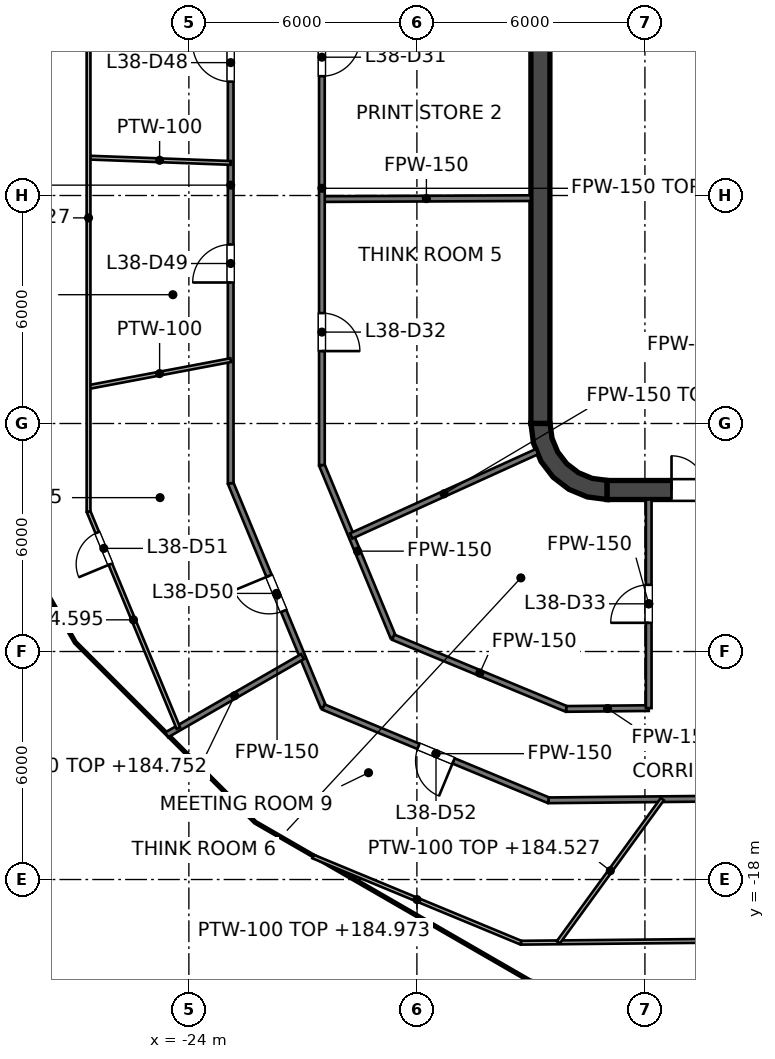
"""IFC4 building model, lengths in metres.
Left out: names, types, materials, properties, quantities, classifications, styles, units other than length and angle.
Written with IfcOpenShell. Run it as: python <this file> out.ifc"""

import sys

from ifc_helpers import new_model, si_unit, direction, frame, frame_2d, origin, place, context, subcontext, project, spatial, polyline, rectangle, outline, extrude, element, fill, save


model = new_model("IFC4")
c1 = context("Model", 3, precision=1e-05, world=origin(), true_north=direction((0.0, 1.0)))
c2 = subcontext(c1, "Body", "Model", "MODEL_VIEW")
j1 = project(units=[si_unit("LENGTHUNIT", "METRE"), si_unit("PLANEANGLEUNIT", "RADIAN")], contexts=[c1])
p1 = place(None, origin())
s1 = spatial("IfcSite", under=j1, at=p1, CompositionType="ELEMENT")
p2 = place(p1, origin())
s2 = spatial("IfcBuilding", under=s1, at=p2, CompositionType="ELEMENT")
p3 = place(p2, frame((0.0, 0.0, 181.6)))
s3 = spatial("IfcBuildingStorey", under=s2, at=p3, CompositionType="ELEMENT", Elevation=181.6)
p4 = place(p3, frame((-13.0, -7.75, 0.0), z_axis=(0.0, 0.0, 1.0), x_axis=(1.0, 0.0, 0.0)))
e1 = element("IfcWall", 1, at=p4, inside=s3, PredefinedType="SHEAR", context=c2, shape_type="SweptSolid", body=[
    extrude(rectangle(XDim=26.0, YDim=0.5, at=frame_2d((13.0, 0.0))), origin(), (0.0, 0.0, 1.0), 4.0),
])
p5 = place(p4, frame((1.7, 0.0, 0.0)))
e2 = element("IfcOpeningElement", 2, at=p5, cuts=e1, PredefinedType="OPENING", context=c2, shape_type="SweptSolid", body=[
    extrude(rectangle(XDim=1.8, YDim=2.1, at=frame_2d((0.9, 1.05))), frame((0.0, 0.25, 0.0), z_axis=(0.0, -1.0, 0.0), x_axis=(1.0, 0.0, 0.0)), (0.0, 0.0, 1.0), 0.5),
])
p6 = place(p4, frame((22.5, 0.0, 0.0)))
e3 = element("IfcOpeningElement", 3, at=p6, cuts=e1, PredefinedType="OPENING", context=c2, shape_type="SweptSolid", body=[
    extrude(rectangle(XDim=1.8, YDim=2.1, at=frame_2d((0.9, 1.05))), frame((0.0, 0.25, 0.0), z_axis=(0.0, -1.0, 0.0), x_axis=(1.0, 0.0, 0.0)), (0.0, 0.0, 1.0), 0.5),
])
p7 = place(p3, frame((-14.75, -6.0, 0.0), z_axis=(0.0, 0.0, 1.0), x_axis=(0.0, 1.0, 0.0)))
e4 = element("IfcWall", 4, at=p7, inside=s3, PredefinedType="SHEAR", context=c2, shape_type="SweptSolid", body=[
    extrude(rectangle(XDim=12.0, YDim=0.5, at=frame_2d((6.0, 0.0))), origin(), (0.0, 0.0, 1.0), 4.0),
])
p8 = place(p3, origin())
e5 = element("IfcWall", 5, at=p8, inside=s3, PredefinedType="SHEAR", context=c2, shape_type="SweptSolid", body=[
    extrude(outline(polyline([(-13.0, -8.0), (-13.0, -7.496), (-13.387, -7.445), (-13.748, -7.295), (-14.058, -7.058), (-14.295, -6.748), (-14.445, -6.387), (-14.496, -6.0), (-15.0, -6.0), (-14.932, -6.518), (-14.732, -7.0), (-14.414, -7.414), (-14.0, -7.732), (-13.518, -7.932), (-13.0, -8.0)])), origin(), (0.0, 0.0, 1.0), 4.0),
])
p9 = place(p3, frame((-11.8, -7.5, 0.0), z_axis=(0.0, 0.0, 1.0), x_axis=(0.0, 1.0, 0.0)))
e6 = element("IfcWall", 6, at=p9, inside=s3, PredefinedType="SOLIDWALL", context=c2, shape_type="SweptSolid", body=[
    extrude(rectangle(XDim=15.0, YDim=0.4, at=frame_2d((7.5, 0.0))), origin(), (0.0, 0.0, 1.0), 3.85),
])
p10 = place(p9, frame((11.3, 0.0, 0.0)))
e7 = element("IfcOpeningElement", 7, at=p10, cuts=e6, PredefinedType="OPENING", context=c2, shape_type="SweptSolid", body=[
    extrude(rectangle(XDim=1.1, YDim=2.1, at=frame_2d((0.55, 1.05))), frame((0.0, 0.2, 0.0), z_axis=(0.0, -1.0, 0.0), x_axis=(1.0, 0.0, 0.0)), (0.0, 0.0, 1.0), 0.4),
])
p11 = place(p9, frame((8.4, 0.0, 0.0)))
e8 = element("IfcOpeningElement", 8, at=p11, cuts=e6, PredefinedType="OPENING", context=c2, shape_type="SweptSolid", body=[
    extrude(rectangle(XDim=1.1, YDim=2.1, at=frame_2d((0.55, 1.05))), frame((0.0, 0.2, 0.0), z_axis=(0.0, -1.0, 0.0), x_axis=(1.0, 0.0, 0.0)), (0.0, 0.0, 1.0), 0.4),
])
p12 = place(p9, frame((5.5, 0.0, 0.0)))
e9 = element("IfcOpeningElement", 9, at=p12, cuts=e6, PredefinedType="OPENING", context=c2, shape_type="SweptSolid", body=[
    extrude(rectangle(XDim=1.1, YDim=2.1, at=frame_2d((0.55, 1.05))), frame((0.0, 0.2, 0.0), z_axis=(0.0, -1.0, 0.0), x_axis=(1.0, 0.0, 0.0)), (0.0, 0.0, 1.0), 0.4),
])
p13 = place(p9, frame((13.697, 0.0, 0.0)))
e10 = element("IfcOpeningElement", 10, at=p13, cuts=e6, PredefinedType="OPENING", context=c2, shape_type="SweptSolid", body=[
    extrude(rectangle(XDim=0.9, YDim=2.1, at=frame_2d((0.45, 1.05))), frame((0.0, 0.2, 0.0), z_axis=(0.0, -1.0, 0.0), x_axis=(1.0, 0.0, 0.0)), (0.0, 0.0, 1.0), 0.4),
])
p14 = place(p9, frame((0.403, 0.0, 0.0)))
e11 = element("IfcOpeningElement", 11, at=p14, cuts=e6, PredefinedType="OPENING", context=c2, shape_type="SweptSolid", body=[
    extrude(rectangle(XDim=0.9, YDim=2.1, at=frame_2d((0.45, 1.05))), frame((0.0, 0.2, 0.0), z_axis=(0.0, -1.0, 0.0), x_axis=(1.0, 0.0, 0.0)), (0.0, 0.0, 1.0), 0.4),
])
e12 = element("IfcWall", 12, at=p8, inside=s3, PredefinedType="SOLIDWALL", context=c2, shape_type="SweptSolid", body=[
    extrude(outline(polyline([(-12.0, -5.925), (-12.0, -5.675), (-14.25, -5.675), (-14.25, -3.025), (-12.0, -3.025), (-12.0, -2.775), (-14.25, -2.775), (-14.25, -0.125), (-12.0, -0.125), (-12.0, 0.125), (-14.25, 0.125), (-14.25, 2.775), (-12.0, 2.775), (-12.0, 3.025), (-14.25, 3.025), (-14.25, 5.675), (-12.0, 5.675), (-12.0, 5.925), (-14.25, 5.925), (-14.5, 5.925), (-14.5, 5.675), (-14.5, 3.025), (-14.5, 2.775), (-14.5, 0.125), (-14.5, -0.125), (-14.5, -2.775), (-14.5, -3.025), (-14.5, -5.675), (-14.5, -5.925), (-14.25, -5.925), (-12.0, -5.925)])), origin(), (0.0, 0.0, 1.0), 3.85),
])
p15 = place(p3, frame((-22.9, -7.572, 0.0), z_axis=(0.0, 0.0, 1.0), x_axis=(0.382906596633, -0.923787063265, 0.0)))
e13 = element("IfcWall", 13, at=p15, inside=s3, PredefinedType="PARTITIONING", context=c2, shape_type="SweptSolid", body=[
    extrude(rectangle(XDim=6.374, YDim=0.15, at=frame_2d((3.187, 0.0))), origin(), (0.0, 0.0, 1.0), 2.995),
])
p16 = place(p15, frame((2.638, 0.0, 0.0)))
e14 = element("IfcOpeningElement", 14, at=p16, cuts=e13, PredefinedType="OPENING", context=c2, shape_type="SweptSolid", body=[
    extrude(rectangle(XDim=1.0, YDim=2.1, at=frame_2d((0.5, 1.05))), frame((0.0, 0.075, 0.0), z_axis=(0.0, -1.0, 0.0), x_axis=(1.0, 0.0, 0.0)), (0.0, 0.0, 1.0), 0.15),
])
p17 = place(p3, frame((-20.5, -7.095, 0.0), z_axis=(0.0, 0.0, 1.0), x_axis=(0.382920689694, -0.923781221613, 0.0)))
e15 = element("IfcWall", 15, at=p17, inside=s3, PredefinedType="PARTITIONING", context=c2, shape_type="SweptSolid", body=[
    extrude(rectangle(XDim=4.902, YDim=0.15, at=frame_2d((2.451, 0.0))), origin(), (0.0, 0.0, 1.0), 2.995),
])
p18 = place(p3, frame((-20.46, -13.46, 0.0), z_axis=(0.0, 0.0, 1.0), x_axis=(0.923801547606, -0.382871650349, 0.0)))
e16 = element("IfcWall", 16, at=p18, inside=s3, PredefinedType="PARTITIONING", context=c2, shape_type="SweptSolid", body=[
    extrude(rectangle(XDim=6.415, YDim=0.15, at=frame_2d((3.208, 0.0))), origin(), (0.0, 0.0, 1.0), 2.995),
])
p19 = place(p18, frame((2.707, 0.0, 0.0)))
e17 = element("IfcOpeningElement", 17, at=p19, cuts=e16, PredefinedType="OPENING", context=c2, shape_type="SweptSolid", body=[
    extrude(rectangle(XDim=1.0, YDim=2.1, at=frame_2d((0.5, 1.05))), frame((0.0, 0.075, 0.0), z_axis=(0.0, -1.0, 0.0), x_axis=(1.0, 0.0, 0.0)), (0.0, 0.0, 1.0), 0.15),
])
p20 = place(p3, frame((-18.623, -11.623, 0.0), z_axis=(0.0, 0.0, 1.0), x_axis=(0.923791670587, -0.38289548098, 0.0)))
e18 = element("IfcWall", 18, at=p20, inside=s3, PredefinedType="PARTITIONING", context=c2, shape_type="SweptSolid", body=[
    extrude(rectangle(XDim=4.931, YDim=0.15, at=frame_2d((2.465, 0.0))), origin(), (0.0, 0.0, 1.0), 2.995),
])
p21 = place(p3, frame((-20.5, -0.094, 0.0), z_axis=(0.0, 0.0, 1.0), x_axis=(0.999990148138, 0.004438876723, 0.0)))
e19 = element("IfcWall", 19, at=p21, inside=s3, PredefinedType="PARTITIONING", context=c2, shape_type="SweptSolid", body=[
    extrude(rectangle(XDim=5.5, YDim=0.15, at=frame_2d((2.75, 0.0))), origin(), (0.0, 0.0, 1.0), 2.995),
])
p22 = place(p3, frame((-14.534, -15.916, 0.0), z_axis=(0.0, 0.0, 1.0), x_axis=(0.999950564508, 0.009943266119, 0.0)))
e20 = element("IfcWall", 20, at=p22, inside=s3, PredefinedType="PARTITIONING", context=c2, shape_type="SweptSolid", body=[
    extrude(rectangle(XDim=33.123, YDim=0.15, at=frame_2d((16.561, 0.0))), origin(), (0.0, 0.0, 1.0), 2.927),
])
p23 = place(p22, frame((20.091, 0.0, 0.0)))
e21 = element("IfcOpeningElement", 21, at=p23, cuts=e20, PredefinedType="OPENING", context=c2, shape_type="SweptSolid", body=[
    extrude(rectangle(XDim=1.0, YDim=2.1, at=frame_2d((0.5, 1.05))), frame((0.0, 0.075, 0.0), z_axis=(0.0, -1.0, 0.0), x_axis=(1.0, 0.0, 0.0)), (0.0, 0.0, 1.0), 0.15),
])
p24 = place(p22, frame((27.906, 0.0, 0.0)))
e22 = element("IfcOpeningElement", 22, at=p24, cuts=e20, PredefinedType="OPENING", context=c2, shape_type="SweptSolid", body=[
    extrude(rectangle(XDim=1.0, YDim=2.1, at=frame_2d((0.5, 1.05))), frame((0.0, 0.075, 0.0), z_axis=(0.0, -1.0, 0.0), x_axis=(1.0, 0.0, 0.0)), (0.0, 0.0, 1.0), 0.15),
])
p25 = place(p22, frame((8.214, 0.0, 0.0)))
e23 = element("IfcOpeningElement", 23, at=p25, cuts=e20, PredefinedType="OPENING", context=c2, shape_type="SweptSolid", body=[
    extrude(rectangle(XDim=1.0, YDim=2.1, at=frame_2d((0.5, 1.05))), frame((0.0, 0.075, 0.0), z_axis=(0.0, -1.0, 0.0), x_axis=(1.0, 0.0, 0.0)), (0.0, 0.0, 1.0), 0.15),
])
p26 = place(p3, frame((-14.068, -13.511, 0.0), z_axis=(0.0, 0.0, 1.0), x_axis=(0.999950911515, 0.009908307647, 0.0)))
e24 = element("IfcWall", 24, at=p26, inside=s3, PredefinedType="PARTITIONING", context=c2, shape_type="SweptSolid", body=[
    extrude(rectangle(XDim=2.168, YDim=0.15, at=frame_2d((1.084, 0.0))), origin(), (0.0, 0.0, 1.0), 3.076),
])
p27 = place(p3, frame((-19.728, -8.958, 0.0), z_axis=(0.0, 0.0, 1.0), x_axis=(0.910629511797, 0.413223779863, 0.0)))
e25 = element("IfcWall", 25, at=p27, inside=s3, PredefinedType="PARTITIONING", context=c2, shape_type="SweptSolid", body=[
    extrude(rectangle(XDim=5.368, YDim=0.15, at=frame_2d((2.684, 0.0))), origin(), (0.0, 0.0, 1.0), 3.85),
])
p28 = place(p3, frame((-24.583, -14.193, 0.0), z_axis=(0.0, 0.0, 1.0), x_axis=(0.866294951489, 0.499532838785, 0.0)))
e26 = element("IfcWall", 26, at=p28, inside=s3, PredefinedType="PARTITIONING", context=c2, shape_type="SweptSolid", body=[
    extrude(rectangle(XDim=4.125, YDim=0.15, at=frame_2d((2.062, 0.0))), origin(), (0.0, 0.0, 1.0), 3.152),
])
p29 = place(p3, frame((-11.9, -13.49, 0.0), z_axis=(0.0, 0.0, 1.0), x_axis=(0.0, 1.0, 0.0)))
e27 = element("IfcWall", 27, at=p29, inside=s3, PredefinedType="PARTITIONING", context=c2, shape_type="SweptSolid", body=[
    extrude(rectangle(XDim=5.49, YDim=0.15, at=frame_2d((2.745, 0.0))), origin(), (0.0, 0.0, 1.0), 2.995),
])
p30 = place(p29, frame((2.245, 0.0, 0.0)))
e28 = element("IfcOpeningElement", 28, at=p30, cuts=e27, PredefinedType="OPENING", context=c2, shape_type="SweptSolid", body=[
    extrude(rectangle(XDim=1.0, YDim=2.1, at=frame_2d((0.5, 1.05))), frame((0.0, 0.075, 0.0), z_axis=(0.0, -1.0, 0.0), x_axis=(1.0, 0.0, 0.0)), (0.0, 0.0, 1.0), 0.15),
])
p31 = place(p3, frame((-20.5, -7.095, 0.0), z_axis=(0.0, 0.0, 1.0), x_axis=(0.0, 1.0, 0.0)))
e29 = element("IfcWall", 29, at=p31, inside=s3, PredefinedType="PARTITIONING", context=c2, shape_type="SweptSolid", body=[
    extrude(rectangle(XDim=14.569, YDim=0.15, at=frame_2d((7.285, 0.0))), origin(), (0.0, 0.0, 1.0), 2.927),
])
p32 = place(p31, frame((10.234, 0.0, 0.0)))
e30 = element("IfcOpeningElement", 30, at=p32, cuts=e29, PredefinedType="OPENING", context=c2, shape_type="SweptSolid", body=[
    extrude(rectangle(XDim=1.0, YDim=2.1, at=frame_2d((0.5, 1.05))), frame((0.0, 0.075, 0.0), z_axis=(0.0, -1.0, 0.0), x_axis=(1.0, 0.0, 0.0)), (0.0, 0.0, 1.0), 0.15),
])
p33 = place(p31, frame((3.0, 0.0, 0.0)))
e31 = element("IfcOpeningElement", 31, at=p33, cuts=e29, PredefinedType="OPENING", context=c2, shape_type="SweptSolid", body=[
    extrude(rectangle(XDim=1.0, YDim=2.1, at=frame_2d((0.5, 1.05))), frame((0.0, 0.075, 0.0), z_axis=(0.0, -1.0, 0.0), x_axis=(1.0, 0.0, 0.0)), (0.0, 0.0, 1.0), 0.15),
])
p34 = place(p3, frame((-22.9, -7.572, 0.0), z_axis=(0.0, 0.0, 1.0), x_axis=(0.0, 1.0, 0.0)))
e32 = element("IfcWall", 32, at=p34, inside=s3, PredefinedType="PARTITIONING", context=c2, shape_type="SweptSolid", body=[
    extrude(rectangle(XDim=15.689, YDim=0.15, at=frame_2d((7.844, 0.0))), origin(), (0.0, 0.0, 1.0), 2.927),
])
p35 = place(p34, frame((10.569, 0.0, 0.0)))
e33 = element("IfcOpeningElement", 33, at=p35, cuts=e32, PredefinedType="OPENING", context=c2, shape_type="SweptSolid", body=[
    extrude(rectangle(XDim=1.0, YDim=2.1, at=frame_2d((0.5, 1.05))), frame((0.0, 0.075, 0.0), z_axis=(0.0, -1.0, 0.0), x_axis=(1.0, 0.0, 0.0)), (0.0, 0.0, 1.0), 0.15),
])
p36 = place(p34, frame((5.282, 0.0, 0.0)))
e34 = element("IfcOpeningElement", 34, at=p36, cuts=e32, PredefinedType="OPENING", context=c2, shape_type="SweptSolid", body=[
    extrude(rectangle(XDim=1.0, YDim=2.1, at=frame_2d((0.5, 1.05))), frame((0.0, 0.075, 0.0), z_axis=(0.0, -1.0, 0.0), x_axis=(1.0, 0.0, 0.0)), (0.0, 0.0, 1.0), 0.15),
])
p37 = place(p3, frame((-26.64, -8.316, 0.0), z_axis=(0.0, 0.0, 1.0), x_axis=(0.382861877987, -0.923805597723, 0.0)))
e35 = element("IfcWall", 35, at=p37, inside=s3, PredefinedType="PARTITIONING", context=c2, shape_type="SweptSolid", body=[
    extrude(rectangle(XDim=6.171, YDim=0.1, at=frame_2d((3.086, 0.0))), origin(), (0.0, 0.0, 1.0), 2.995),
])
p38 = place(p37, frame((0.6, 0.0, 0.0)))
e36 = element("IfcOpeningElement", 36, at=p38, cuts=e35, PredefinedType="OPENING", context=c2, shape_type="SweptSolid", body=[
    extrude(rectangle(XDim=0.9, YDim=2.1, at=frame_2d((0.45, 1.05))), frame((0.0, 0.05, 0.0), z_axis=(0.0, -1.0, 0.0), x_axis=(1.0, 0.0, 0.0)), (0.0, 0.0, 1.0), 0.1),
])
p39 = place(p3, frame((-20.732, -17.395, 0.0), z_axis=(0.0, 0.0, 1.0), x_axis=(0.923788700377, -0.382902646968, 0.0)))
e37 = element("IfcWall", 37, at=p39, inside=s3, PredefinedType="PARTITIONING", context=c2, shape_type="SweptSolid", body=[
    extrude(rectangle(XDim=5.923, YDim=0.1, at=frame_2d((2.962, 0.0))), origin(), (0.0, 0.0, 1.0), 3.373),
])
p40 = place(p3, frame((-26.64, 0.997, 0.0), z_axis=(0.0, 0.0, 1.0), x_axis=(0.999298745045, -0.037443532845, 0.0)))
e38 = element("IfcWall", 38, at=p40, inside=s3, PredefinedType="PARTITIONING", context=c2, shape_type="SweptSolid", body=[
    extrude(rectangle(XDim=3.743, YDim=0.1, at=frame_2d((1.871, 0.0))), origin(), (0.0, 0.0, 1.0), 3.85),
])
p41 = place(p3, frame((-15.26, -19.663, 0.0), z_axis=(0.0, 0.0, 1.0), x_axis=(0.999950698652, 0.009929766651, 0.0)))
e39 = element("IfcWall", 39, at=p41, inside=s3, PredefinedType="PARTITIONING", context=c2, shape_type="SweptSolid", body=[
    extrude(rectangle(XDim=32.627, YDim=0.1, at=frame_2d((16.313, 0.0))), origin(), (0.0, 0.0, 1.0), 2.927),
])
p42 = place(p41, frame((27.063, 0.0, 0.0)))
e40 = element("IfcOpeningElement", 40, at=p42, cuts=e39, PredefinedType="OPENING", context=c2, shape_type="SweptSolid", body=[
    extrude(rectangle(XDim=0.9, YDim=2.1, at=frame_2d((0.45, 1.05))), frame((0.0, 0.05, 0.0), z_axis=(0.0, -1.0, 0.0), x_axis=(1.0, 0.0, 0.0)), (0.0, 0.0, 1.0), 0.1),
])
p43 = place(p41, frame((7.131, 0.0, 0.0)))
e41 = element("IfcOpeningElement", 41, at=p43, cuts=e39, PredefinedType="OPENING", context=c2, shape_type="SweptSolid", body=[
    extrude(rectangle(XDim=0.9, YDim=2.1, at=frame_2d((0.45, 1.05))), frame((0.0, 0.05, 0.0), z_axis=(0.0, -1.0, 0.0), x_axis=(1.0, 0.0, 0.0)), (0.0, 0.0, 1.0), 0.1),
])
p44 = place(p3, frame((-26.64, -5.041, 0.0), z_axis=(0.0, 0.0, 1.0), x_axis=(0.982549025403, 0.186003797485, 0.0)))
e42 = element("IfcWall", 42, at=p44, inside=s3, PredefinedType="PARTITIONING", context=c2, shape_type="SweptSolid", body=[
    extrude(rectangle(XDim=3.806, YDim=0.1, at=frame_2d((1.903, 0.0))), origin(), (0.0, 0.0, 1.0), 3.85),
])
p45 = place(p3, frame((-14.279, -19.653, 0.0), z_axis=(0.0, 0.0, 1.0), x_axis=(0.587800653116, 0.809005804797, 0.0)))
e43 = element("IfcWall", 43, at=p45, inside=s3, PredefinedType="PARTITIONING", context=c2, shape_type="SweptSolid", body=[
    extrude(rectangle(XDim=4.656, YDim=0.1, at=frame_2d((2.328, 0.0))), origin(), (0.0, 0.0, 1.0), 2.927),
])
p46 = place(p3, frame((-26.64, -8.316, 0.0), z_axis=(0.0, 0.0, 1.0), x_axis=(0.0, 1.0, 0.0)))
e44 = element("IfcWall", 44, at=p46, inside=s3, PredefinedType="PARTITIONING", context=c2, shape_type="SweptSolid", body=[
    extrude(rectangle(XDim=15.454, YDim=0.1, at=frame_2d((7.727, 0.0))), origin(), (0.0, 0.0, 1.0), 2.927),
])
p47 = place(p11, origin())
e45 = element("IfcDoor", 45, at=p47, inside=s3, OperationType="DOUBLE_DOOR_SLIDING", PredefinedType="DOOR", context=c2, shape_type="SweptSolid", body=[
    extrude(rectangle(XDim=1.1, YDim=2.1, at=frame_2d((0.55, 1.05))), frame((0.0, 0.025, 0.0), z_axis=(0.0, -1.0, 0.0), x_axis=(1.0, 0.0, 0.0)), (0.0, 0.0, 1.0), 0.05),
])
fill(e8, e45)
p48 = place(p12, origin())
e46 = element("IfcDoor", 46, at=p48, inside=s3, OperationType="DOUBLE_DOOR_SLIDING", PredefinedType="DOOR", context=c2, shape_type="SweptSolid", body=[
    extrude(rectangle(XDim=1.1, YDim=2.1, at=frame_2d((0.55, 1.05))), frame((0.0, 0.025, 0.0), z_axis=(0.0, -1.0, 0.0), x_axis=(1.0, 0.0, 0.0)), (0.0, 0.0, 1.0), 0.05),
])
fill(e9, e46)
p49 = place(p14, origin())
e47 = element("IfcDoor", 47, at=p49, inside=s3, OperationType="SINGLE_SWING_LEFT", PredefinedType="DOOR", context=c2, shape_type="SweptSolid", body=[
    extrude(rectangle(XDim=0.9, YDim=2.1, at=frame_2d((0.45, 1.05))), frame((0.0, 0.025, 0.0), z_axis=(0.0, -1.0, 0.0), x_axis=(1.0, 0.0, 0.0)), (0.0, 0.0, 1.0), 0.05),
])
fill(e11, e47)
p50 = place(p5, origin())
e48 = element("IfcDoor", 48, at=p50, inside=s3, OperationType="DOUBLE_DOOR_SINGLE_SWING", PredefinedType="DOOR", context=c2, shape_type="SweptSolid", body=[
    extrude(rectangle(XDim=1.8, YDim=2.1, at=frame_2d((0.9, 1.05))), frame((0.0, 0.025, 0.0), z_axis=(0.0, -1.0, 0.0), x_axis=(1.0, 0.0, 0.0)), (0.0, 0.0, 1.0), 0.05),
])
fill(e2, e48)
p51 = place(p32, origin())
e49 = element("IfcDoor", 49, at=p51, inside=s3, OperationType="SINGLE_SWING_RIGHT", PredefinedType="DOOR", context=c2, shape_type="SweptSolid", body=[
    extrude(rectangle(XDim=1.0, YDim=2.1, at=frame_2d((0.5, 1.05))), frame((0.0, 0.025, 0.0), z_axis=(0.0, -1.0, 0.0), x_axis=(1.0, 0.0, 0.0)), (0.0, 0.0, 1.0), 0.05),
])
fill(e30, e49)
p52 = place(p33, origin())
e50 = element("IfcDoor", 50, at=p52, inside=s3, OperationType="SINGLE_SWING_LEFT", PredefinedType="DOOR", context=c2, shape_type="SweptSolid", body=[
    extrude(rectangle(XDim=1.0, YDim=2.1, at=frame_2d((0.5, 1.05))), frame((0.0, 0.025, 0.0), z_axis=(0.0, -1.0, 0.0), x_axis=(1.0, 0.0, 0.0)), (0.0, 0.0, 1.0), 0.05),
])
fill(e31, e50)
p53 = place(p30, origin())
e51 = element("IfcDoor", 51, at=p53, inside=s3, OperationType="SINGLE_SWING_LEFT", PredefinedType="DOOR", context=c2, shape_type="SweptSolid", body=[
    extrude(rectangle(XDim=1.0, YDim=2.1, at=frame_2d((0.5, 1.05))), frame((0.0, 0.025, 0.0), z_axis=(0.0, -1.0, 0.0), x_axis=(1.0, 0.0, 0.0)), (0.0, 0.0, 1.0), 0.05),
])
fill(e28, e51)
p54 = place(p35, origin())
e52 = element("IfcDoor", 52, at=p54, inside=s3, OperationType="SINGLE_SWING_RIGHT", PredefinedType="DOOR", context=c2, shape_type="SweptSolid", body=[
    extrude(rectangle(XDim=1.0, YDim=2.1, at=frame_2d((0.5, 1.05))), frame((0.0, 0.025, 0.0), z_axis=(0.0, -1.0, 0.0), x_axis=(1.0, 0.0, 0.0)), (0.0, 0.0, 1.0), 0.05),
])
fill(e33, e52)
p55 = place(p36, origin())
e53 = element("IfcDoor", 53, at=p55, inside=s3, OperationType="SINGLE_SWING_LEFT", PredefinedType="DOOR", context=c2, shape_type="SweptSolid", body=[
    extrude(rectangle(XDim=1.0, YDim=2.1, at=frame_2d((0.5, 1.05))), frame((0.0, 0.025, 0.0), z_axis=(0.0, -1.0, 0.0), x_axis=(1.0, 0.0, 0.0)), (0.0, 0.0, 1.0), 0.05),
])
fill(e34, e53)
p56 = place(p16, origin())
e54 = element("IfcDoor", 54, at=p56, inside=s3, OperationType="SINGLE_SWING_LEFT", PredefinedType="DOOR", context=c2, shape_type="SweptSolid", body=[
    extrude(rectangle(XDim=1.0, YDim=2.1, at=frame_2d((0.5, 1.05))), frame((0.0, 0.025, 0.0), z_axis=(0.0, -1.0, 0.0), x_axis=(1.0, 0.0, 0.0)), (0.0, 0.0, 1.0), 0.05),
])
fill(e14, e54)
p57 = place(p38, origin())
e55 = element("IfcDoor", 55, at=p57, inside=s3, OperationType="SINGLE_SWING_RIGHT", PredefinedType="DOOR", context=c2, shape_type="SweptSolid", body=[
    extrude(rectangle(XDim=0.9, YDim=2.1, at=frame_2d((0.45, 1.05))), frame((0.0, 0.025, 0.0), z_axis=(0.0, -1.0, 0.0), x_axis=(1.0, 0.0, 0.0)), (0.0, 0.0, 1.0), 0.05),
])
fill(e36, e55)
p58 = place(p19, origin())
e56 = element("IfcDoor", 56, at=p58, inside=s3, OperationType="SINGLE_SWING_RIGHT", PredefinedType="DOOR", context=c2, shape_type="SweptSolid", body=[
    extrude(rectangle(XDim=1.0, YDim=2.1, at=frame_2d((0.5, 1.05))), frame((0.0, 0.025, 0.0), z_axis=(0.0, -1.0, 0.0), x_axis=(1.0, 0.0, 0.0)), (0.0, 0.0, 1.0), 0.05),
])
fill(e17, e56)
save(model, sys.argv[1])
